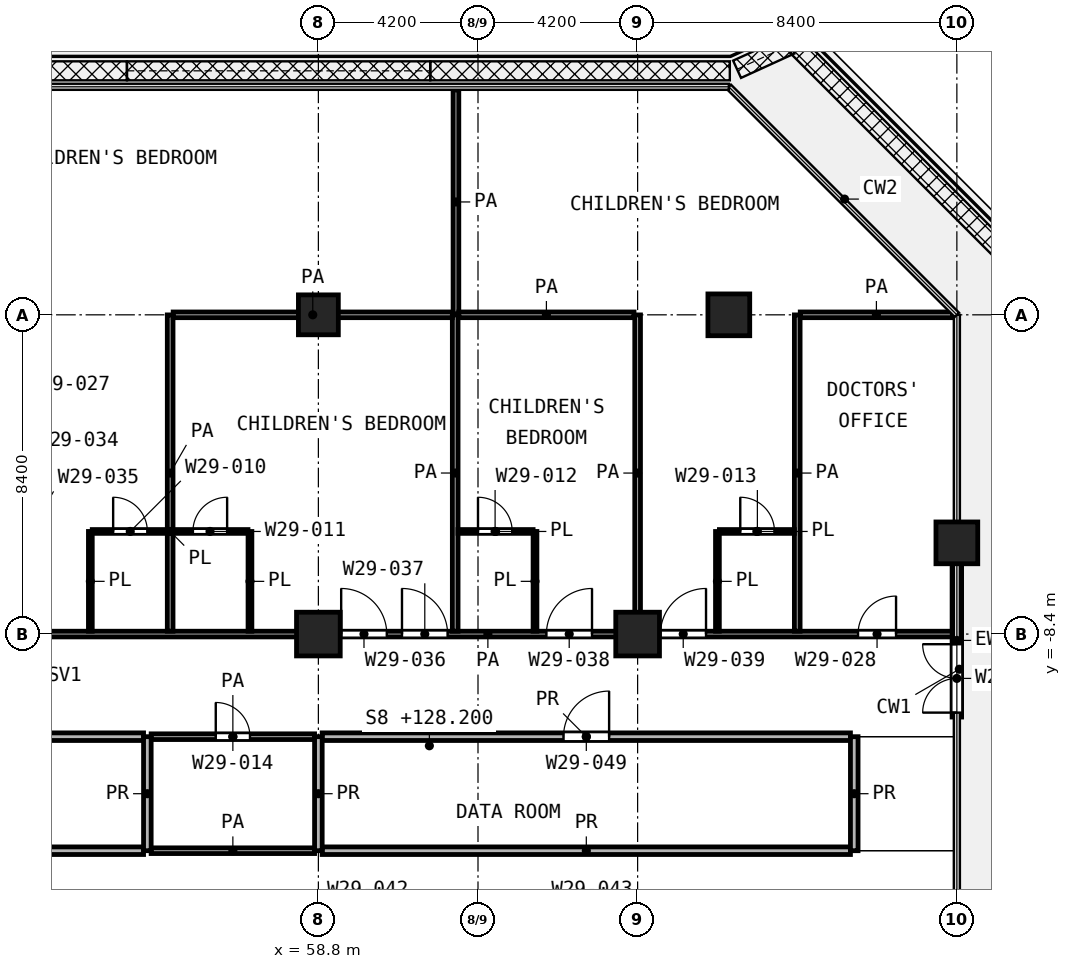
"""IFC4 building model, lengths in metres.
Left out: names, types, materials, properties, quantities, classifications, styles, units other than length and angle.
Written with IfcOpenShell. Run it as: python <this file> out.ifc"""

import sys

from ifc_helpers import new_model, si_unit, direction, frame, frame_2d, origin, origin_2d, place, context, subcontext, project, spatial, rectangle, extrude, element, fill, save


model = new_model("IFC4")
c1 = context("Model", 3, precision=1e-05, world=origin(), true_north=direction((0.0, 1.0)))
c2 = subcontext(c1, "Body", "Model", "MODEL_VIEW")
j1 = project(units=[si_unit("LENGTHUNIT", "METRE"), si_unit("PLANEANGLEUNIT", "RADIAN")], contexts=[c1])
p1 = place(None, origin())
s1 = spatial("IfcSite", under=j1, at=p1, CompositionType="ELEMENT")
p2 = place(p1, origin())
s2 = spatial("IfcBuilding", under=s1, at=p2, CompositionType="ELEMENT")
p3 = place(p2, frame((0.0, 0.0, 128.2)))
s3 = spatial("IfcBuildingStorey", under=s2, at=p3, CompositionType="ELEMENT", Elevation=128.2)
p4 = place(p3, frame((58.8, 0.0, 0.0), z_axis=(0.0, 0.0, 1.0), x_axis=(1.0, 0.0, 0.0)))
e1 = element("IfcColumn", 1, at=p4, inside=s3, PredefinedType="COLUMN", context=c2, shape_type="SweptSolid", body=[
    extrude(rectangle(XDim=1.05, YDim=1.05, at=origin_2d()), origin(), (0.0, 0.0, 1.0), 4.2),
])
for number, where, z_axis, x_axis in (
    (2, (69.6, 0.0, 0.0), (0.0, 0.0, 1.0), (1.0, 0.0, 0.0)),
    (3, (75.6, -6.0, 0.0), (0.0, 0.0, 1.0), (1.0, 0.0, 0.0)),
):
    element("IfcColumn", number, at=place(p3, frame(where, z_axis=z_axis, x_axis=x_axis)), inside=s3, PredefinedType="COLUMN", context=c2, shape_type="SweptSolid", body=[
        extrude(rectangle(XDim=1.1, YDim=1.1, at=origin_2d()), origin(), (0.0, 0.0, 1.0), 4.2),
    ])
for number, where, z_axis, x_axis in (
    (4, (58.8, -8.4, 0.0), (0.0, 0.0, 1.0), (1.0, 0.0, 0.0)),
    (5, (67.2, -8.4, 0.0), (0.0, 0.0, 1.0), (1.0, 0.0, 0.0)),
):
    element("IfcColumn", number, at=place(p3, frame(where, z_axis=z_axis, x_axis=x_axis)), inside=s3, PredefinedType="COLUMN", context=c2, shape_type="SweptSolid", body=[
        extrude(rectangle(XDim=1.15, YDim=1.15, at=origin_2d()), origin(), (0.0, 0.0, 1.0), 4.2),
    ])
p5 = place(p3, frame((75.6, -10.583, 0.0), z_axis=(0.0, 0.0, 1.0), x_axis=(0.0, 1.0, 0.0)))
e6 = element("IfcWall", 6, at=p5, inside=s3, PredefinedType="SOLIDWALL", context=c2, shape_type="SweptSolid", body=[
    extrude(rectangle(XDim=4.033, YDim=0.25, at=frame_2d((2.017, 0.0))), origin(), (0.0, 0.0, 1.0), 3.48),
])
p6 = place(p5, frame((0.117, 0.0, 0.0)))
e7 = element("IfcOpeningElement", 7, at=p6, cuts=e6, PredefinedType="OPENING", context=c2, shape_type="SweptSolid", body=[
    extrude(rectangle(XDim=1.8, YDim=2.1, at=frame_2d((0.9, 1.05))), frame((0.0, 0.135, 0.0), z_axis=(0.0, -1.0, 0.0), x_axis=(1.0, 0.0, 0.0)), (0.0, 0.0, 1.0), 0.27),
])
p7 = place(p3, frame((52.85, -5.7, 0.0), z_axis=(0.0, 0.0, 1.0), x_axis=(1.0, 0.0, 0.0)))
e8 = element("IfcWall", 8, at=p7, inside=s3, PredefinedType="PARTITIONING", context=c2, shape_type="SweptSolid", body=[
    extrude(rectangle(XDim=4.098, YDim=0.1, at=frame_2d((2.049, 0.0))), origin(), (0.0, 0.0, 1.0), 3.6),
])
p8 = place(p7, frame((0.55, 0.0, 0.0)))
e9 = element("IfcOpeningElement", 9, at=p8, cuts=e8, PredefinedType="OPENING", context=c2, shape_type="SweptSolid", body=[
    extrude(rectangle(XDim=0.9, YDim=2.1, at=frame_2d((0.45, 1.05))), frame((0.0, 0.06, 0.0), z_axis=(0.0, -1.0, 0.0), x_axis=(1.0, 0.0, 0.0)), (0.0, 0.0, 1.0), 0.12),
])
p9 = place(p7, frame((2.649, 0.0, 0.0)))
e10 = element("IfcOpeningElement", 10, at=p9, cuts=e8, PredefinedType="OPENING", context=c2, shape_type="SweptSolid", body=[
    extrude(rectangle(XDim=0.9, YDim=2.1, at=frame_2d((0.45, 1.05))), frame((0.0, 0.06, 0.0), z_axis=(0.0, -1.0, 0.0), x_axis=(1.0, 0.0, 0.0)), (0.0, 0.0, 1.0), 0.12),
])
p10 = place(p3, frame((62.475, -5.7, 0.0), z_axis=(0.0, 0.0, 1.0), x_axis=(1.0, 0.0, 0.0)))
e11 = element("IfcWall", 11, at=p10, inside=s3, PredefinedType="PARTITIONING", context=c2, shape_type="SweptSolid", body=[
    extrude(rectangle(XDim=1.975, YDim=0.1, at=frame_2d((0.987, 0.0))), origin(), (0.0, 0.0, 1.0), 3.6),
])
p11 = place(p10, frame((0.525, 0.0, 0.0)))
e12 = element("IfcOpeningElement", 12, at=p11, cuts=e11, PredefinedType="OPENING", context=c2, shape_type="SweptSolid", body=[
    extrude(rectangle(XDim=0.9, YDim=2.1, at=frame_2d((0.45, 1.05))), frame((0.0, 0.06, 0.0), z_axis=(0.0, -1.0, 0.0), x_axis=(1.0, 0.0, 0.0)), (0.0, 0.0, 1.0), 0.12),
])
p12 = place(p3, frame((69.352, -5.7, 0.0), z_axis=(0.0, 0.0, 1.0), x_axis=(1.0, 0.0, 0.0)))
e13 = element("IfcWall", 13, at=p12, inside=s3, PredefinedType="PARTITIONING", context=c2, shape_type="SweptSolid", body=[
    extrude(rectangle(XDim=1.973, YDim=0.1, at=frame_2d((0.986, 0.0))), origin(), (0.0, 0.0, 1.0), 3.6),
])
p13 = place(p12, frame((0.549, 0.0, 0.0)))
e14 = element("IfcOpeningElement", 14, at=p13, cuts=e13, PredefinedType="OPENING", context=c2, shape_type="SweptSolid", body=[
    extrude(rectangle(XDim=0.9, YDim=2.1, at=frame_2d((0.45, 1.05))), frame((0.0, 0.06, 0.0), z_axis=(0.0, -1.0, 0.0), x_axis=(1.0, 0.0, 0.0)), (0.0, 0.0, 1.0), 0.12),
])
p14 = place(p3, frame((52.8, -8.325, 0.0), z_axis=(0.0, 0.0, 1.0), x_axis=(0.0, 1.0, 0.0)))
e15 = element("IfcWall", 15, at=p14, inside=s3, PredefinedType="PARTITIONING", context=c2, shape_type="SweptSolid", body=[
    extrude(rectangle(XDim=2.625, YDim=0.1, at=frame_2d((1.312, 0.0))), origin(), (0.0, 0.0, 1.0), 3.6),
])
p15 = place(p3, frame((57.0, -8.325, 0.0), z_axis=(0.0, 0.0, 1.0), x_axis=(0.0, 1.0, 0.0)))
e16 = element("IfcWall", 16, at=p15, inside=s3, PredefinedType="PARTITIONING", context=c2, shape_type="SweptSolid", body=[
    extrude(rectangle(XDim=2.624, YDim=0.1, at=frame_2d((1.312, 0.0))), origin(), (0.0, 0.0, 1.0), 3.6),
])
p16 = place(p3, frame((64.5, -8.325, 0.0), z_axis=(0.0, 0.0, 1.0), x_axis=(0.0, 1.0, 0.0)))
e17 = element("IfcWall", 17, at=p16, inside=s3, PredefinedType="PARTITIONING", context=c2, shape_type="SweptSolid", body=[
    extrude(rectangle(XDim=2.625, YDim=0.1, at=frame_2d((1.312, 0.0))), origin(), (0.0, 0.0, 1.0), 3.6),
])
p17 = place(p3, frame((69.3, -8.325, 0.0), z_axis=(0.0, 0.0, 1.0), x_axis=(0.0, 1.0, 0.0)))
e18 = element("IfcWall", 18, at=p17, inside=s3, PredefinedType="PARTITIONING", context=c2, shape_type="SweptSolid", body=[
    extrude(rectangle(XDim=2.624, YDim=0.1, at=frame_2d((1.312, 0.0))), origin(), (0.0, 0.0, 1.0), 3.6),
])
p18 = place(p3, frame((54.4, -14.1, 0.0), z_axis=(0.0, 0.0, 1.0), x_axis=(1.0, 0.0, 0.0)))
e19 = element("IfcWall", 19, at=p18, inside=s3, PredefinedType="PARTITIONING", context=c2, shape_type="SweptSolid", body=[
    extrude(rectangle(XDim=4.3, YDim=0.15, at=frame_2d((2.15, 0.0))), origin(), (0.0, 0.0, 1.0), 3.6),
])
p19 = place(p3, frame((54.4, -11.1, 0.0), z_axis=(0.0, 0.0, 1.0), x_axis=(1.0, 0.0, 0.0)))
e20 = element("IfcWall", 20, at=p19, inside=s3, PredefinedType="PARTITIONING", context=c2, shape_type="SweptSolid", body=[
    extrude(rectangle(XDim=4.3, YDim=0.15, at=frame_2d((2.15, 0.0))), origin(), (0.0, 0.0, 1.0), 3.6),
])
p20 = place(p19, frame((1.7, 0.0, 0.0)))
e21 = element("IfcOpeningElement", 21, at=p20, cuts=e20, PredefinedType="OPENING", context=c2, shape_type="SweptSolid", body=[
    extrude(rectangle(XDim=0.9, YDim=2.1, at=frame_2d((0.45, 1.05))), frame((0.0, 0.085, 0.0), z_axis=(0.0, -1.0, 0.0), x_axis=(1.0, 0.0, 0.0)), (0.0, 0.0, 1.0), 0.17),
])
p21 = place(p3, frame((51.0, -8.4, 0.0), z_axis=(0.0, 0.0, 1.0), x_axis=(1.0, 0.0, 0.0)))
e22 = element("IfcWall", 22, at=p21, inside=s3, PredefinedType="PARTITIONING", context=c2, shape_type="SweptSolid", body=[
    extrude(rectangle(XDim=24.52, YDim=0.15, at=frame_2d((12.26, 0.0))), origin(), (0.0, 0.0, 1.0), 3.6),
])
p22 = place(p21, frame((8.4, 0.0, 0.0)))
e23 = element("IfcOpeningElement", 23, at=p22, cuts=e22, PredefinedType="OPENING", context=c2, shape_type="SweptSolid", body=[
    extrude(rectangle(XDim=1.2, YDim=2.1, at=frame_2d((0.6, 1.05))), frame((0.0, 0.085, 0.0), z_axis=(0.0, -1.0, 0.0), x_axis=(1.0, 0.0, 0.0)), (0.0, 0.0, 1.0), 0.17),
])
p23 = place(p21, frame((10.0, 0.0, 0.0)))
e24 = element("IfcOpeningElement", 24, at=p23, cuts=e22, PredefinedType="OPENING", context=c2, shape_type="SweptSolid", body=[
    extrude(rectangle(XDim=1.2, YDim=2.1, at=frame_2d((0.6, 1.05))), frame((0.0, 0.085, 0.0), z_axis=(0.0, -1.0, 0.0), x_axis=(1.0, 0.0, 0.0)), (0.0, 0.0, 1.0), 0.17),
])
p24 = place(p21, frame((13.8, 0.0, 0.0)))
e25 = element("IfcOpeningElement", 25, at=p24, cuts=e22, PredefinedType="OPENING", context=c2, shape_type="SweptSolid", body=[
    extrude(rectangle(XDim=1.2, YDim=2.1, at=frame_2d((0.6, 1.05))), frame((0.0, 0.085, 0.0), z_axis=(0.0, -1.0, 0.0), x_axis=(1.0, 0.0, 0.0)), (0.0, 0.0, 1.0), 0.17),
])
p25 = place(p21, frame((16.8, 0.0, 0.0)))
e26 = element("IfcOpeningElement", 26, at=p25, cuts=e22, PredefinedType="OPENING", context=c2, shape_type="SweptSolid", body=[
    extrude(rectangle(XDim=1.2, YDim=2.1, at=frame_2d((0.6, 1.05))), frame((0.0, 0.085, 0.0), z_axis=(0.0, -1.0, 0.0), x_axis=(1.0, 0.0, 0.0)), (0.0, 0.0, 1.0), 0.17),
])
p26 = place(p21, frame((22.0, 0.0, 0.0)))
e27 = element("IfcOpeningElement", 27, at=p26, cuts=e22, PredefinedType="OPENING", context=c2, shape_type="SweptSolid", body=[
    extrude(rectangle(XDim=1.0, YDim=2.1, at=frame_2d((0.5, 1.05))), frame((0.0, 0.085, 0.0), z_axis=(0.0, -1.0, 0.0), x_axis=(1.0, 0.0, 0.0)), (0.0, 0.0, 1.0), 0.17),
])
p27 = place(p3, frame((54.979, 0.0, 0.0), z_axis=(0.0, 0.0, 1.0), x_axis=(1.0, 0.0, 0.0)))
e28 = element("IfcWall", 28, at=p27, inside=s3, PredefinedType="PARTITIONING", context=c2, shape_type="SweptSolid", body=[
    extrude(rectangle(XDim=7.346, YDim=0.15, at=frame_2d((3.673, 0.0))), origin(), (0.0, 0.0, 1.0), 3.6),
])
p28 = place(p3, frame((62.495, 0.0, 0.0), z_axis=(0.0, 0.0, 1.0), x_axis=(1.0, 0.0, 0.0)))
e29 = element("IfcWall", 29, at=p28, inside=s3, PredefinedType="PARTITIONING", context=c2, shape_type="SweptSolid", body=[
    extrude(rectangle(XDim=4.61, YDim=0.15, at=frame_2d((2.305, 0.0))), origin(), (0.0, 0.0, 1.0), 3.6),
])
p29 = place(p3, frame((71.479, 0.0, 0.0), z_axis=(0.0, 0.0, 1.0), x_axis=(1.0, 0.0, 0.0)))
e30 = element("IfcWall", 30, at=p29, inside=s3, PredefinedType="PARTITIONING", context=c2, shape_type="SweptSolid", body=[
    extrude(rectangle(XDim=4.008, YDim=0.15, at=frame_2d((2.004, 0.0))), origin(), (0.0, 0.0, 1.0), 3.6),
])
p30 = place(p3, frame((54.9, -8.325, 0.0), z_axis=(0.0, 0.0, 1.0), x_axis=(0.0, 1.0, 0.0)))
e31 = element("IfcWall", 31, at=p30, inside=s3, PredefinedType="PARTITIONING", context=c2, shape_type="SweptSolid", body=[
    extrude(rectangle(XDim=8.323, YDim=0.15, at=frame_2d((4.162, 0.0))), origin(), (0.0, 0.0, 1.0), 3.6),
])
p31 = place(p3, frame((62.4, -8.325, 0.0), z_axis=(0.0, 0.0, 1.0), x_axis=(0.0, 1.0, 0.0)))
e32 = element("IfcWall", 32, at=p31, inside=s3, PredefinedType="PARTITIONING", context=c2, shape_type="SweptSolid", body=[
    extrude(rectangle(XDim=8.325, YDim=0.15, at=frame_2d((4.163, 0.0))), origin(), (0.0, 0.0, 1.0), 3.6),
])
p32 = place(p3, frame((62.42, 0.02, 0.0), z_axis=(0.0, 0.0, 1.0), x_axis=(0.0, 1.0, 0.0)))
e33 = element("IfcWall", 33, at=p32, inside=s3, PredefinedType="PARTITIONING", context=c2, shape_type="SweptSolid", body=[
    extrude(rectangle(XDim=5.9, YDim=0.15, at=frame_2d((2.95, 0.0))), origin(), (0.0, 0.0, 1.0), 3.6),
])
for number, where, z_axis, x_axis in (
    (34, (67.2, -8.325, 0.0), (0.0, 0.0, 1.0), (0.0, 1.0, 0.0)),
    (35, (71.4, -8.325, 0.0), (0.0, 0.0, 1.0), (0.0, 1.0, 0.0)),
):
    element("IfcWall", number, at=place(p3, frame(where, z_axis=z_axis, x_axis=x_axis)), inside=s3, PredefinedType="PARTITIONING", context=c2, shape_type="SweptSolid", body=[
        extrude(rectangle(XDim=8.323, YDim=0.15, at=frame_2d((4.162, 0.0))), origin(), (0.0, 0.0, 1.0), 3.6),
    ])
p33 = place(p3, frame((37.9, -14.1, 0.0), z_axis=(0.0, 0.0, 1.0), x_axis=(1.0, 0.0, 0.0)))
e36 = element("IfcWall", 36, at=p33, inside=s3, PredefinedType="PARTITIONING", context=c2, shape_type="SweptSolid", body=[
    extrude(rectangle(XDim=16.3, YDim=0.2, at=frame_2d((8.15, 0.0))), origin(), (0.0, 0.0, 1.0), 3.6),
])
p34 = place(p3, frame((58.9, -14.1, 0.0), z_axis=(0.0, 0.0, 1.0), x_axis=(1.0, 0.0, 0.0)))
e37 = element("IfcWall", 37, at=p34, inside=s3, PredefinedType="PARTITIONING", context=c2, shape_type="SweptSolid", body=[
    extrude(rectangle(XDim=13.9, YDim=0.2, at=frame_2d((6.95, 0.0))), origin(), (0.0, 0.0, 1.0), 3.6),
])
p35 = place(p3, frame((37.9, -11.1, 0.0), z_axis=(0.0, 0.0, 1.0), x_axis=(1.0, 0.0, 0.0)))
e38 = element("IfcWall", 38, at=p35, inside=s3, PredefinedType="PARTITIONING", context=c2, shape_type="SweptSolid", body=[
    extrude(rectangle(XDim=16.3, YDim=0.2, at=frame_2d((8.15, 0.0))), origin(), (0.0, 0.0, 1.0), 3.6),
])
p36 = place(p35, frame((7.55, 0.0, 0.0)))
e39 = element("IfcOpeningElement", 39, at=p36, cuts=e38, PredefinedType="OPENING", context=c2, shape_type="SweptSolid", body=[
    extrude(rectangle(XDim=1.2, YDim=2.1, at=frame_2d((0.6, 1.05))), frame((0.0, 0.11, 0.0), z_axis=(0.0, -1.0, 0.0), x_axis=(1.0, 0.0, 0.0)), (0.0, 0.0, 1.0), 0.22),
])
p37 = place(p3, frame((58.9, -11.1, 0.0), z_axis=(0.0, 0.0, 1.0), x_axis=(1.0, 0.0, 0.0)))
e40 = element("IfcWall", 40, at=p37, inside=s3, PredefinedType="PARTITIONING", context=c2, shape_type="SweptSolid", body=[
    extrude(rectangle(XDim=13.9, YDim=0.2, at=frame_2d((6.95, 0.0))), origin(), (0.0, 0.0, 1.0), 3.6),
])
p38 = place(p37, frame((6.35, 0.0, 0.0)))
e41 = element("IfcOpeningElement", 41, at=p38, cuts=e40, PredefinedType="OPENING", context=c2, shape_type="SweptSolid", body=[
    extrude(rectangle(XDim=1.2, YDim=2.1, at=frame_2d((0.6, 1.05))), frame((0.0, 0.11, 0.0), z_axis=(0.0, -1.0, 0.0), x_axis=(1.0, 0.0, 0.0)), (0.0, 0.0, 1.0), 0.22),
])
for number, where, z_axis, x_axis in (
    (42, (54.3, -14.1, 0.0), (0.0, 0.0, 1.0), (0.0, 1.0, 0.0)),
    (43, (58.8, -14.1, 0.0), (0.0, 0.0, 1.0), (0.0, 1.0, 0.0)),
    (44, (72.9, -14.1, 0.0), (0.0, 0.0, 1.0), (0.0, 1.0, 0.0)),
):
    element("IfcWall", number, at=place(p3, frame(where, z_axis=z_axis, x_axis=x_axis)), inside=s3, PredefinedType="PARTITIONING", context=c2, shape_type="SweptSolid", body=[
        extrude(rectangle(XDim=3.0, YDim=0.2, at=frame_2d((1.5, 0.0))), origin(), (0.0, 0.0, 1.0), 3.6),
    ])
p39 = place(p6, origin())
e45 = element("IfcDoor", 45, at=p39, inside=s3, OperationType="DOUBLE_DOOR_SINGLE_SWING", PredefinedType="DOOR", context=c2, shape_type="SweptSolid", body=[
    extrude(rectangle(XDim=1.8, YDim=2.1, at=frame_2d((0.9, 1.05))), frame((0.0, 0.025, 0.0), z_axis=(0.0, -1.0, 0.0), x_axis=(1.0, 0.0, 0.0)), (0.0, 0.0, 1.0), 0.05),
])
fill(e7, e45)
p40 = place(p8, origin())
e46 = element("IfcDoor", 46, at=p40, inside=s3, OperationType="SINGLE_SWING_LEFT", PredefinedType="DOOR", context=c2, shape_type="SweptSolid", body=[
    extrude(rectangle(XDim=0.9, YDim=2.1, at=frame_2d((0.45, 1.05))), frame((0.0, 0.025, 0.0), z_axis=(0.0, -1.0, 0.0), x_axis=(1.0, 0.0, 0.0)), (0.0, 0.0, 1.0), 0.05),
])
fill(e9, e46)
p41 = place(p22, origin())
e47 = element("IfcDoor", 47, at=p41, inside=s3, OperationType="SINGLE_SWING_LEFT", PredefinedType="DOOR", context=c2, shape_type="SweptSolid", body=[
    extrude(rectangle(XDim=1.2, YDim=2.1, at=frame_2d((0.6, 1.05))), frame((0.0, 0.025, 0.0), z_axis=(0.0, -1.0, 0.0), x_axis=(1.0, 0.0, 0.0)), (0.0, 0.0, 1.0), 0.05),
])
fill(e23, e47)
p42 = place(p23, origin())
e48 = element("IfcDoor", 48, at=p42, inside=s3, OperationType="SINGLE_SWING_LEFT", PredefinedType="DOOR", context=c2, shape_type="SweptSolid", body=[
    extrude(rectangle(XDim=1.2, YDim=2.1, at=frame_2d((0.6, 1.05))), frame((0.0, 0.025, 0.0), z_axis=(0.0, -1.0, 0.0), x_axis=(1.0, 0.0, 0.0)), (0.0, 0.0, 1.0), 0.05),
])
fill(e24, e48)
p43 = place(p9, origin())
e49 = element("IfcDoor", 49, at=p43, inside=s3, OperationType="SINGLE_SWING_RIGHT", PredefinedType="DOOR", context=c2, shape_type="SweptSolid", body=[
    extrude(rectangle(XDim=0.9, YDim=2.1, at=frame_2d((0.45, 1.05))), frame((0.0, 0.025, 0.0), z_axis=(0.0, -1.0, 0.0), x_axis=(1.0, 0.0, 0.0)), (0.0, 0.0, 1.0), 0.05),
])
fill(e10, e49)
p44 = place(p24, origin())
e50 = element("IfcDoor", 50, at=p44, inside=s3, OperationType="SINGLE_SWING_RIGHT", PredefinedType="DOOR", context=c2, shape_type="SweptSolid", body=[
    extrude(rectangle(XDim=1.2, YDim=2.1, at=frame_2d((0.6, 1.05))), frame((0.0, 0.025, 0.0), z_axis=(0.0, -1.0, 0.0), x_axis=(1.0, 0.0, 0.0)), (0.0, 0.0, 1.0), 0.05),
])
fill(e25, e50)
p45 = place(p11, origin())
e51 = element("IfcDoor", 51, at=p45, inside=s3, OperationType="SINGLE_SWING_LEFT", PredefinedType="DOOR", context=c2, shape_type="SweptSolid", body=[
    extrude(rectangle(XDim=0.9, YDim=2.1, at=frame_2d((0.45, 1.05))), frame((0.0, 0.025, 0.0), z_axis=(0.0, -1.0, 0.0), x_axis=(1.0, 0.0, 0.0)), (0.0, 0.0, 1.0), 0.05),
])
fill(e12, e51)
p46 = place(p25, origin())
e52 = element("IfcDoor", 52, at=p46, inside=s3, OperationType="SINGLE_SWING_RIGHT", PredefinedType="DOOR", context=c2, shape_type="SweptSolid", body=[
    extrude(rectangle(XDim=1.2, YDim=2.1, at=frame_2d((0.6, 1.05))), frame((0.0, 0.025, 0.0), z_axis=(0.0, -1.0, 0.0), x_axis=(1.0, 0.0, 0.0)), (0.0, 0.0, 1.0), 0.05),
])
fill(e26, e52)
p47 = place(p13, origin())
e53 = element("IfcDoor", 53, at=p47, inside=s3, OperationType="SINGLE_SWING_LEFT", PredefinedType="DOOR", context=c2, shape_type="SweptSolid", body=[
    extrude(rectangle(XDim=0.9, YDim=2.1, at=frame_2d((0.45, 1.05))), frame((0.0, 0.025, 0.0), z_axis=(0.0, -1.0, 0.0), x_axis=(1.0, 0.0, 0.0)), (0.0, 0.0, 1.0), 0.05),
])
fill(e14, e53)
p48 = place(p26, origin())
e54 = element("IfcDoor", 54, at=p48, inside=s3, OperationType="SINGLE_SWING_RIGHT", PredefinedType="DOOR", context=c2, shape_type="SweptSolid", body=[
    extrude(rectangle(XDim=1.0, YDim=2.1, at=frame_2d((0.5, 1.05))), frame((0.0, 0.025, 0.0), z_axis=(0.0, -1.0, 0.0), x_axis=(1.0, 0.0, 0.0)), (0.0, 0.0, 1.0), 0.05),
])
fill(e27, e54)
p49 = place(p20, origin())
e55 = element("IfcDoor", 55, at=p49, inside=s3, OperationType="SINGLE_SWING_LEFT", PredefinedType="DOOR", context=c2, shape_type="SweptSolid", body=[
    extrude(rectangle(XDim=0.9, YDim=2.1, at=frame_2d((0.45, 1.05))), frame((0.0, 0.025, 0.0), z_axis=(0.0, -1.0, 0.0), x_axis=(1.0, 0.0, 0.0)), (0.0, 0.0, 1.0), 0.05),
])
fill(e21, e55)
p50 = place(p38, origin())
e56 = element("IfcDoor", 56, at=p50, inside=s3, OperationType="SINGLE_SWING_RIGHT", PredefinedType="DOOR", context=c2, shape_type="SweptSolid", body=[
    extrude(rectangle(XDim=1.2, YDim=2.1, at=frame_2d((0.6, 1.05))), frame((0.0, 0.025, 0.0), z_axis=(0.0, -1.0, 0.0), x_axis=(1.0, 0.0, 0.0)), (0.0, 0.0, 1.0), 0.05),
])
fill(e41, e56)
save(model, sys.argv[1])
